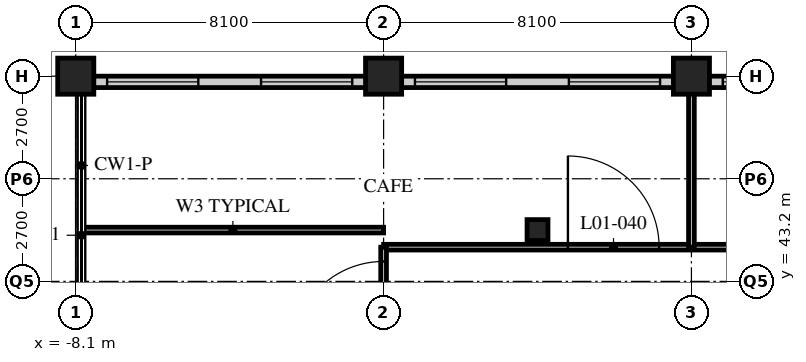
"""IFC4 building model, lengths in metres.
Left out: names, types, materials, properties, quantities, classifications, styles, units other than length and angle.
Written with IfcOpenShell. Run it as: python <this file> out.ifc"""

import sys

from ifc_helpers import new_model, si_unit, direction, frame, frame_2d, origin, origin_2d, place, context, subcontext, project, spatial, rectangle, hollow_rectangle, extrude, element, fill, save


model = new_model("IFC4")
c1 = context("Model", 3, precision=1e-05, world=origin(), true_north=direction((0.0, 1.0)))
c2 = subcontext(c1, "Body", "Model", "MODEL_VIEW")
j1 = project(units=[si_unit("LENGTHUNIT", "METRE"), si_unit("PLANEANGLEUNIT", "RADIAN")], contexts=[c1])
p1 = place(None, origin())
s1 = spatial("IfcSite", under=j1, at=p1, CompositionType="ELEMENT")
p2 = place(p1, origin())
s2 = spatial("IfcBuilding", under=s1, at=p2, CompositionType="ELEMENT")
p3 = place(p2, frame((0.0, 0.0, 6.0)))
s3 = spatial("IfcBuildingStorey", under=s2, at=p3, CompositionType="ELEMENT", Elevation=6.0)
for number, where, z_axis, x_axis in (
    (1, (-8.1, 48.6, 0.0), (0.0, 0.0, 1.0), (1.0, 0.0, 0.0)),
    (2, (0.0, 48.6, 0.0), (0.0, 0.0, 1.0), (1.0, 0.0, 0.0)),
):
    element("IfcColumn", number, at=place(p3, frame(where, z_axis=z_axis, x_axis=x_axis)), inside=s3, PredefinedType="COLUMN", context=c2, shape_type="SweptSolid", body=[
        extrude(hollow_rectangle(XDim=0.95, YDim=0.95, WallThickness=0.1, at=origin_2d()), origin(), (0.0, 0.0, 1.0), 5.4),
    ])
p4 = place(p3, frame((4.05, 44.55, 0.0), z_axis=(0.0, 0.0, 1.0), x_axis=(1.0, 0.0, 0.0)))
e3 = element("IfcColumn", 3, at=p4, inside=s3, PredefinedType="COLUMN", context=c2, shape_type="SweptSolid", body=[
    extrude(hollow_rectangle(XDim=0.55, YDim=0.55, WallThickness=0.05, at=origin_2d()), origin(), (0.0, 0.0, 1.0), 5.4),
])
p5 = place(p3, frame((8.1, 48.6, 0.0), z_axis=(0.0, 0.0, 1.0), x_axis=(1.0, 0.0, 0.0)))
e4 = element("IfcColumn", 4, at=p5, inside=s3, PredefinedType="COLUMN", context=c2, shape_type="SweptSolid", body=[
    extrude(hollow_rectangle(XDim=0.95, YDim=0.95, WallThickness=0.1, at=origin_2d()), origin(), (0.0, 0.0, 1.0), 5.4),
])
p6 = place(p3, frame((64.5, 48.45, 0.0), z_axis=(0.0, 0.0, 1.0), x_axis=(-1.0, 0.0, 0.0)))
e5 = element("IfcWall", 5, at=p6, inside=s3, PredefinedType="SOLIDWALL", context=c2, shape_type="SweptSolid", body=[
    extrude(rectangle(XDim=72.6, YDim=0.3, at=frame_2d((36.3, 0.0))), origin(), (0.0, 0.0, 1.0), 5.15),
])
p7 = place(p6, frame((0.525, 0.0, 1.0)))
e6 = element("IfcOpeningElement", 6, at=p7, cuts=e5, PredefinedType="OPENING", context=c2, shape_type="SweptSolid", body=[
    extrude(rectangle(XDim=2.4, YDim=2.75, at=frame_2d((1.2, 1.375))), frame((0.0, 0.16, 0.0), z_axis=(0.0, -1.0, 0.0), x_axis=(1.0, 0.0, 0.0)), (0.0, 0.0, 1.0), 0.32),
])
p8 = place(p6, frame((4.575, 0.0, 1.0)))
e7 = element("IfcOpeningElement", 7, at=p8, cuts=e5, PredefinedType="OPENING", context=c2, shape_type="SweptSolid", body=[
    extrude(rectangle(XDim=2.4, YDim=2.75, at=frame_2d((1.2, 1.375))), frame((0.0, 0.16, 0.0), z_axis=(0.0, -1.0, 0.0), x_axis=(1.0, 0.0, 0.0)), (0.0, 0.0, 1.0), 0.32),
])
p9 = place(p6, frame((8.625, 0.0, 1.0)))
e8 = element("IfcOpeningElement", 8, at=p9, cuts=e5, PredefinedType="OPENING", context=c2, shape_type="SweptSolid", body=[
    extrude(rectangle(XDim=2.4, YDim=2.75, at=frame_2d((1.2, 1.375))), frame((0.0, 0.16, 0.0), z_axis=(0.0, -1.0, 0.0), x_axis=(1.0, 0.0, 0.0)), (0.0, 0.0, 1.0), 0.32),
])
p10 = place(p6, frame((12.675, 0.0, 1.0)))
e9 = element("IfcOpeningElement", 9, at=p10, cuts=e5, PredefinedType="OPENING", context=c2, shape_type="SweptSolid", body=[
    extrude(rectangle(XDim=2.4, YDim=2.75, at=frame_2d((1.2, 1.375))), frame((0.0, 0.16, 0.0), z_axis=(0.0, -1.0, 0.0), x_axis=(1.0, 0.0, 0.0)), (0.0, 0.0, 1.0), 0.32),
])
p11 = place(p6, frame((16.725, 0.0, 1.0)))
e10 = element("IfcOpeningElement", 10, at=p11, cuts=e5, PredefinedType="OPENING", context=c2, shape_type="SweptSolid", body=[
    extrude(rectangle(XDim=2.4, YDim=2.75, at=frame_2d((1.2, 1.375))), frame((0.0, 0.16, 0.0), z_axis=(0.0, -1.0, 0.0), x_axis=(1.0, 0.0, 0.0)), (0.0, 0.0, 1.0), 0.32),
])
p12 = place(p6, frame((20.775, 0.0, 1.0)))
e11 = element("IfcOpeningElement", 11, at=p12, cuts=e5, PredefinedType="OPENING", context=c2, shape_type="SweptSolid", body=[
    extrude(rectangle(XDim=2.4, YDim=2.75, at=frame_2d((1.2, 1.375))), frame((0.0, 0.16, 0.0), z_axis=(0.0, -1.0, 0.0), x_axis=(1.0, 0.0, 0.0)), (0.0, 0.0, 1.0), 0.32),
])
p13 = place(p6, frame((24.825, 0.0, 1.0)))
e12 = element("IfcOpeningElement", 12, at=p13, cuts=e5, PredefinedType="OPENING", context=c2, shape_type="SweptSolid", body=[
    extrude(rectangle(XDim=2.4, YDim=2.75, at=frame_2d((1.2, 1.375))), frame((0.0, 0.16, 0.0), z_axis=(0.0, -1.0, 0.0), x_axis=(1.0, 0.0, 0.0)), (0.0, 0.0, 1.0), 0.32),
])
p14 = place(p6, frame((28.875, 0.0, 1.0)))
e13 = element("IfcOpeningElement", 13, at=p14, cuts=e5, PredefinedType="OPENING", context=c2, shape_type="SweptSolid", body=[
    extrude(rectangle(XDim=2.4, YDim=2.75, at=frame_2d((1.2, 1.375))), frame((0.0, 0.16, 0.0), z_axis=(0.0, -1.0, 0.0), x_axis=(1.0, 0.0, 0.0)), (0.0, 0.0, 1.0), 0.32),
])
p15 = place(p6, frame((32.925, 0.0, 1.0)))
e14 = element("IfcOpeningElement", 14, at=p15, cuts=e5, PredefinedType="OPENING", context=c2, shape_type="SweptSolid", body=[
    extrude(rectangle(XDim=2.4, YDim=2.75, at=frame_2d((1.2, 1.375))), frame((0.0, 0.16, 0.0), z_axis=(0.0, -1.0, 0.0), x_axis=(1.0, 0.0, 0.0)), (0.0, 0.0, 1.0), 0.32),
])
p16 = place(p6, frame((36.975, 0.0, 1.0)))
e15 = element("IfcOpeningElement", 15, at=p16, cuts=e5, PredefinedType="OPENING", context=c2, shape_type="SweptSolid", body=[
    extrude(rectangle(XDim=2.4, YDim=2.75, at=frame_2d((1.2, 1.375))), frame((0.0, 0.16, 0.0), z_axis=(0.0, -1.0, 0.0), x_axis=(1.0, 0.0, 0.0)), (0.0, 0.0, 1.0), 0.32),
])
p17 = place(p6, frame((41.025, 0.0, 1.0)))
e16 = element("IfcOpeningElement", 16, at=p17, cuts=e5, PredefinedType="OPENING", context=c2, shape_type="SweptSolid", body=[
    extrude(rectangle(XDim=2.4, YDim=2.75, at=frame_2d((1.2, 1.375))), frame((0.0, 0.16, 0.0), z_axis=(0.0, -1.0, 0.0), x_axis=(1.0, 0.0, 0.0)), (0.0, 0.0, 1.0), 0.32),
])
p18 = place(p6, frame((45.075, 0.0, 1.0)))
e17 = element("IfcOpeningElement", 17, at=p18, cuts=e5, PredefinedType="OPENING", context=c2, shape_type="SweptSolid", body=[
    extrude(rectangle(XDim=2.4, YDim=2.75, at=frame_2d((1.2, 1.375))), frame((0.0, 0.16, 0.0), z_axis=(0.0, -1.0, 0.0), x_axis=(1.0, 0.0, 0.0)), (0.0, 0.0, 1.0), 0.32),
])
p19 = place(p6, frame((49.125, 0.0, 1.0)))
e18 = element("IfcOpeningElement", 18, at=p19, cuts=e5, PredefinedType="OPENING", context=c2, shape_type="SweptSolid", body=[
    extrude(rectangle(XDim=2.4, YDim=2.75, at=frame_2d((1.2, 1.375))), frame((0.0, 0.16, 0.0), z_axis=(0.0, -1.0, 0.0), x_axis=(1.0, 0.0, 0.0)), (0.0, 0.0, 1.0), 0.32),
])
p20 = place(p6, frame((53.175, 0.0, 1.0)))
e19 = element("IfcOpeningElement", 19, at=p20, cuts=e5, PredefinedType="OPENING", context=c2, shape_type="SweptSolid", body=[
    extrude(rectangle(XDim=2.4, YDim=2.75, at=frame_2d((1.2, 1.375))), frame((0.0, 0.16, 0.0), z_axis=(0.0, -1.0, 0.0), x_axis=(1.0, 0.0, 0.0)), (0.0, 0.0, 1.0), 0.32),
])
p21 = place(p6, frame((57.225, 0.0, 1.0)))
e20 = element("IfcOpeningElement", 20, at=p21, cuts=e5, PredefinedType="OPENING", context=c2, shape_type="SweptSolid", body=[
    extrude(rectangle(XDim=2.4, YDim=2.75, at=frame_2d((1.2, 1.375))), frame((0.0, 0.16, 0.0), z_axis=(0.0, -1.0, 0.0), x_axis=(1.0, 0.0, 0.0)), (0.0, 0.0, 1.0), 0.32),
])
p22 = place(p6, frame((61.275, 0.0, 1.0)))
e21 = element("IfcOpeningElement", 21, at=p22, cuts=e5, PredefinedType="OPENING", context=c2, shape_type="SweptSolid", body=[
    extrude(rectangle(XDim=2.4, YDim=2.75, at=frame_2d((1.2, 1.375))), frame((0.0, 0.16, 0.0), z_axis=(0.0, -1.0, 0.0), x_axis=(1.0, 0.0, 0.0)), (0.0, 0.0, 1.0), 0.32),
])
p23 = place(p6, frame((65.325, 0.0, 1.0)))
e22 = element("IfcOpeningElement", 22, at=p23, cuts=e5, PredefinedType="OPENING", context=c2, shape_type="SweptSolid", body=[
    extrude(rectangle(XDim=2.4, YDim=2.75, at=frame_2d((1.2, 1.375))), frame((0.0, 0.16, 0.0), z_axis=(0.0, -1.0, 0.0), x_axis=(1.0, 0.0, 0.0)), (0.0, 0.0, 1.0), 0.32),
])
p24 = place(p6, frame((69.375, 0.0, 1.0)))
e23 = element("IfcOpeningElement", 23, at=p24, cuts=e5, PredefinedType="OPENING", context=c2, shape_type="SweptSolid", body=[
    extrude(rectangle(XDim=2.4, YDim=2.75, at=frame_2d((1.2, 1.375))), frame((0.0, 0.16, 0.0), z_axis=(0.0, -1.0, 0.0), x_axis=(1.0, 0.0, 0.0)), (0.0, 0.0, 1.0), 0.32),
])
p25 = place(p3, frame((0.0, 44.1, 0.0), z_axis=(0.0, 0.0, 1.0), x_axis=(1.0, 0.0, 0.0)))
e24 = element("IfcWall", 24, at=p25, inside=s3, PredefinedType="PARTITIONING", context=c2, shape_type="SweptSolid", body=[
    extrude(rectangle(XDim=56.7, YDim=0.15, at=frame_2d((28.35, 0.0))), origin(), (0.0, 0.0, 1.0), 5.15),
])
p26 = place(p25, frame((10.95, 0.0, 0.0)))
e25 = element("IfcOpeningElement", 25, at=p26, cuts=e24, PredefinedType="OPENING", context=c2, shape_type="SweptSolid", body=[
    extrude(rectangle(XDim=2.4, YDim=2.7, at=frame_2d((1.2, 1.35))), frame((0.0, 0.085, 0.0), z_axis=(0.0, -1.0, 0.0), x_axis=(1.0, 0.0, 0.0)), (0.0, 0.0, 1.0), 0.17),
])
p27 = place(p25, frame((19.05, 0.0, 0.0)))
e26 = element("IfcOpeningElement", 26, at=p27, cuts=e24, PredefinedType="OPENING", context=c2, shape_type="SweptSolid", body=[
    extrude(rectangle(XDim=2.4, YDim=2.7, at=frame_2d((1.2, 1.35))), frame((0.0, 0.085, 0.0), z_axis=(0.0, -1.0, 0.0), x_axis=(1.0, 0.0, 0.0)), (0.0, 0.0, 1.0), 0.17),
])
p28 = place(p25, frame((27.15, 0.0, 0.0)))
e27 = element("IfcOpeningElement", 27, at=p28, cuts=e24, PredefinedType="OPENING", context=c2, shape_type="SweptSolid", body=[
    extrude(rectangle(XDim=2.4, YDim=2.7, at=frame_2d((1.2, 1.35))), frame((0.0, 0.085, 0.0), z_axis=(0.0, -1.0, 0.0), x_axis=(1.0, 0.0, 0.0)), (0.0, 0.0, 1.0), 0.17),
])
p29 = place(p25, frame((35.25, 0.0, 0.0)))
e28 = element("IfcOpeningElement", 28, at=p29, cuts=e24, PredefinedType="OPENING", context=c2, shape_type="SweptSolid", body=[
    extrude(rectangle(XDim=2.4, YDim=2.7, at=frame_2d((1.2, 1.35))), frame((0.0, 0.085, 0.0), z_axis=(0.0, -1.0, 0.0), x_axis=(1.0, 0.0, 0.0)), (0.0, 0.0, 1.0), 0.17),
])
p30 = place(p25, frame((43.35, 0.0, 0.0)))
e29 = element("IfcOpeningElement", 29, at=p30, cuts=e24, PredefinedType="OPENING", context=c2, shape_type="SweptSolid", body=[
    extrude(rectangle(XDim=2.4, YDim=2.7, at=frame_2d((1.2, 1.35))), frame((0.0, 0.085, 0.0), z_axis=(0.0, -1.0, 0.0), x_axis=(1.0, 0.0, 0.0)), (0.0, 0.0, 1.0), 0.17),
])
p31 = place(p25, frame((53.45, 0.0, 0.0)))
e30 = element("IfcOpeningElement", 30, at=p31, cuts=e24, PredefinedType="OPENING", context=c2, shape_type="SweptSolid", body=[
    extrude(rectangle(XDim=2.4, YDim=2.7, at=frame_2d((1.2, 1.35))), frame((0.0, 0.085, 0.0), z_axis=(0.0, -1.0, 0.0), x_axis=(1.0, 0.0, 0.0)), (0.0, 0.0, 1.0), 0.17),
])
p32 = place(p25, frame((4.85, 0.0, 0.0)))
e31 = element("IfcOpeningElement", 31, at=p32, cuts=e24, PredefinedType="OPENING", context=c2, shape_type="SweptSolid", body=[
    extrude(rectangle(XDim=2.4, YDim=2.7, at=frame_2d((1.2, 1.35))), frame((0.0, 0.085, 0.0), z_axis=(0.0, -1.0, 0.0), x_axis=(1.0, 0.0, 0.0)), (0.0, 0.0, 1.0), 0.17),
])
p33 = place(p3, frame((0.0, 0.0, 0.0), z_axis=(0.0, 0.0, 1.0), x_axis=(0.0, 1.0, 0.0)))
e32 = element("IfcWall", 32, at=p33, inside=s3, PredefinedType="PARTITIONING", context=c2, shape_type="SweptSolid", body=[
    extrude(rectangle(XDim=44.1, YDim=0.15, at=frame_2d((22.05, 0.0))), origin(), (0.0, 0.0, 1.0), 4.538),
])
p34 = place(p33, frame((2.85, 0.0, 0.0)))
e33 = element("IfcOpeningElement", 33, at=p34, cuts=e32, PredefinedType="OPENING", context=c2, shape_type="SweptSolid", body=[
    extrude(rectangle(XDim=2.4, YDim=2.7, at=frame_2d((1.2, 1.35))), frame((0.0, 0.085, 0.0), z_axis=(0.0, -1.0, 0.0), x_axis=(1.0, 0.0, 0.0)), (0.0, 0.0, 1.0), 0.17),
])
p35 = place(p33, frame((10.95, 0.0, 0.0)))
e34 = element("IfcOpeningElement", 34, at=p35, cuts=e32, PredefinedType="OPENING", context=c2, shape_type="SweptSolid", body=[
    extrude(rectangle(XDim=2.4, YDim=2.7, at=frame_2d((1.2, 1.35))), frame((0.0, 0.085, 0.0), z_axis=(0.0, -1.0, 0.0), x_axis=(1.0, 0.0, 0.0)), (0.0, 0.0, 1.0), 0.17),
])
p36 = place(p33, frame((19.05, 0.0, 0.0)))
e35 = element("IfcOpeningElement", 35, at=p36, cuts=e32, PredefinedType="OPENING", context=c2, shape_type="SweptSolid", body=[
    extrude(rectangle(XDim=2.4, YDim=2.7, at=frame_2d((1.2, 1.35))), frame((0.0, 0.085, 0.0), z_axis=(0.0, -1.0, 0.0), x_axis=(1.0, 0.0, 0.0)), (0.0, 0.0, 1.0), 0.17),
])
p37 = place(p33, frame((27.15, 0.0, 0.0)))
e36 = element("IfcOpeningElement", 36, at=p37, cuts=e32, PredefinedType="OPENING", context=c2, shape_type="SweptSolid", body=[
    extrude(rectangle(XDim=2.4, YDim=2.7, at=frame_2d((1.2, 1.35))), frame((0.0, 0.085, 0.0), z_axis=(0.0, -1.0, 0.0), x_axis=(1.0, 0.0, 0.0)), (0.0, 0.0, 1.0), 0.17),
])
p38 = place(p33, frame((35.25, 0.0, 0.0)))
e37 = element("IfcOpeningElement", 37, at=p38, cuts=e32, PredefinedType="OPENING", context=c2, shape_type="SweptSolid", body=[
    extrude(rectangle(XDim=2.4, YDim=2.7, at=frame_2d((1.2, 1.35))), frame((0.0, 0.085, 0.0), z_axis=(0.0, -1.0, 0.0), x_axis=(1.0, 0.0, 0.0)), (0.0, 0.0, 1.0), 0.17),
])
p39 = place(p33, frame((41.325, 0.0, 0.0)))
e38 = element("IfcOpeningElement", 38, at=p39, cuts=e32, PredefinedType="OPENING", context=c2, shape_type="SweptSolid", body=[
    extrude(rectangle(XDim=2.4, YDim=2.7, at=frame_2d((1.2, 1.35))), frame((0.0, 0.085, 0.0), z_axis=(0.0, -1.0, 0.0), x_axis=(1.0, 0.0, 0.0)), (0.0, 0.0, 1.0), 0.17),
])
p40 = place(p3, frame((-7.931, 44.55, 0.0), z_axis=(0.0, 0.0, 1.0), x_axis=(1.0, 0.0, 0.0)))
e39 = element("IfcWall", 39, at=p40, inside=s3, PredefinedType="PARTITIONING", context=c2, shape_type="SweptSolid", body=[
    extrude(rectangle(XDim=7.931, YDim=0.15, at=frame_2d((3.965, 0.0))), origin(), (0.0, 0.0, 1.0), 5.15),
])
p41 = place(p3, frame((8.1, 44.1, 0.0), z_axis=(0.0, 0.0, 1.0), x_axis=(0.0, 1.0, 0.0)))
e40 = element("IfcWall", 40, at=p41, inside=s3, PredefinedType="PARTITIONING", context=c2, shape_type="SweptSolid", body=[
    extrude(rectangle(XDim=4.2, YDim=0.15, at=frame_2d((2.1, 0.0))), origin(), (0.0, 0.0, 1.0), 4.538),
])
p42 = place(p20, origin())
e41 = element("IfcWindow", 41, at=p42, inside=s3, PartitioningType="SINGLE_PANEL", PredefinedType="WINDOW", context=c2, shape_type="SweptSolid", body=[
    extrude(rectangle(XDim=2.4, YDim=2.75, at=frame_2d((1.2, 1.375))), frame((0.0, 0.03, 0.0), z_axis=(0.0, -1.0, 0.0), x_axis=(1.0, 0.0, 0.0)), (0.0, 0.0, 1.0), 0.06),
])
fill(e19, e41)
p43 = place(p21, origin())
e42 = element("IfcWindow", 42, at=p43, inside=s3, PartitioningType="SINGLE_PANEL", PredefinedType="WINDOW", context=c2, shape_type="SweptSolid", body=[
    extrude(rectangle(XDim=2.4, YDim=2.75, at=frame_2d((1.2, 1.375))), frame((0.0, 0.03, 0.0), z_axis=(0.0, -1.0, 0.0), x_axis=(1.0, 0.0, 0.0)), (0.0, 0.0, 1.0), 0.06),
])
fill(e20, e42)
p44 = place(p22, origin())
e43 = element("IfcWindow", 43, at=p44, inside=s3, PartitioningType="SINGLE_PANEL", PredefinedType="WINDOW", context=c2, shape_type="SweptSolid", body=[
    extrude(rectangle(XDim=2.4, YDim=2.75, at=frame_2d((1.2, 1.375))), frame((0.0, 0.03, 0.0), z_axis=(0.0, -1.0, 0.0), x_axis=(1.0, 0.0, 0.0)), (0.0, 0.0, 1.0), 0.06),
])
fill(e21, e43)
p45 = place(p23, origin())
e44 = element("IfcWindow", 44, at=p45, inside=s3, PartitioningType="SINGLE_PANEL", PredefinedType="WINDOW", context=c2, shape_type="SweptSolid", body=[
    extrude(rectangle(XDim=2.4, YDim=2.75, at=frame_2d((1.2, 1.375))), frame((0.0, 0.03, 0.0), z_axis=(0.0, -1.0, 0.0), x_axis=(1.0, 0.0, 0.0)), (0.0, 0.0, 1.0), 0.06),
])
fill(e22, e44)
p46 = place(p24, origin())
e45 = element("IfcWindow", 45, at=p46, inside=s3, PartitioningType="SINGLE_PANEL", PredefinedType="WINDOW", context=c2, shape_type="SweptSolid", body=[
    extrude(rectangle(XDim=2.4, YDim=2.75, at=frame_2d((1.2, 1.375))), frame((0.0, 0.03, 0.0), z_axis=(0.0, -1.0, 0.0), x_axis=(1.0, 0.0, 0.0)), (0.0, 0.0, 1.0), 0.06),
])
fill(e23, e45)
p47 = place(p39, origin())
e46 = element("IfcDoor", 46, at=p47, inside=s3, OperationType="DOUBLE_DOOR_SINGLE_SWING", PredefinedType="DOOR", context=c2, shape_type="SweptSolid", body=[
    extrude(rectangle(XDim=2.4, YDim=2.7, at=frame_2d((1.2, 1.35))), frame((0.0, 0.025, 0.0), z_axis=(0.0, -1.0, 0.0), x_axis=(1.0, 0.0, 0.0)), (0.0, 0.0, 1.0), 0.05),
])
fill(e38, e46)
p48 = place(p32, origin())
e47 = element("IfcDoor", 47, at=p48, inside=s3, OperationType="DOUBLE_DOOR_SINGLE_SWING", PredefinedType="DOOR", context=c2, shape_type="SweptSolid", body=[
    extrude(rectangle(XDim=2.4, YDim=2.7, at=frame_2d((1.2, 1.35))), frame((0.0, 0.025, 0.0), z_axis=(0.0, -1.0, 0.0), x_axis=(1.0, 0.0, 0.0)), (0.0, 0.0, 1.0), 0.05),
])
fill(e31, e47)
save(model, sys.argv[1])
